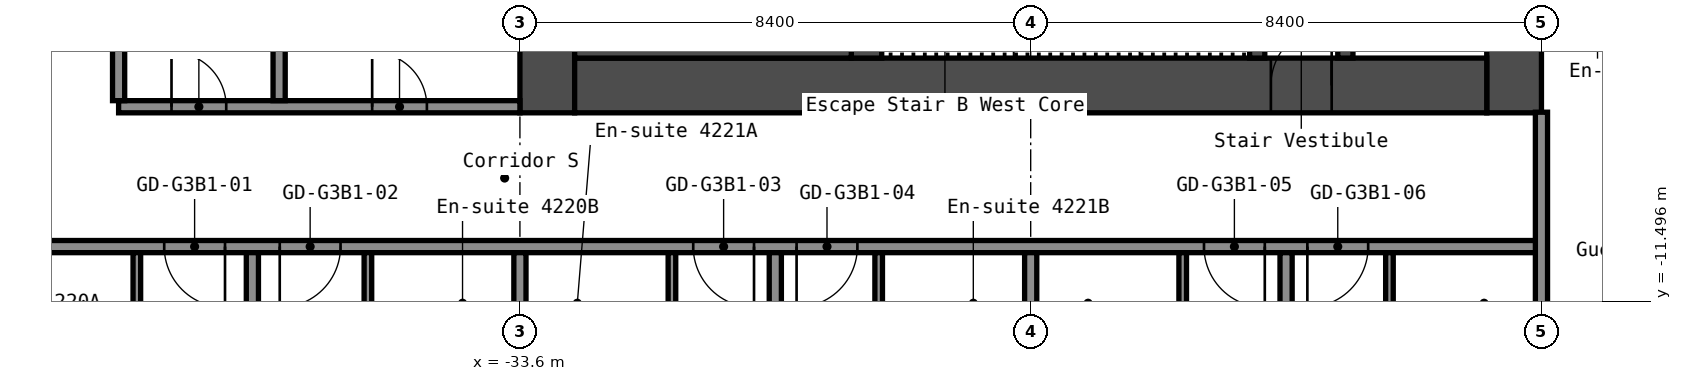
"""IFC4 building model, lengths in metres.
Left out: names, types, materials, properties, quantities, classifications, styles, units other than length and angle.
Written with IfcOpenShell. Run it as: python <this file> out.ifc"""

import sys

from ifc_helpers import new_model, si_unit, direction, frame, frame_2d, origin, place, context, subcontext, project, spatial, rectangle, extrude, element, fill, save


model = new_model("IFC4")
c1 = context("Model", 3, precision=1e-05, world=origin(), true_north=direction((0.0, 1.0)))
c2 = subcontext(c1, "Body", "Model", "MODEL_VIEW")
j1 = project(units=[si_unit("LENGTHUNIT", "METRE"), si_unit("PLANEANGLEUNIT", "RADIAN")], contexts=[c1])
p1 = place(None, origin())
s1 = spatial("IfcSite", under=j1, at=p1, CompositionType="ELEMENT")
p2 = place(p1, origin())
s2 = spatial("IfcBuilding", under=s1, at=p2, CompositionType="ELEMENT")
p3 = place(p2, frame((0.0, 0.0, 150.2)))
s3 = spatial("IfcBuildingStorey", under=s2, at=p3, CompositionType="ELEMENT", Elevation=150.2)
p4 = place(p3, frame((-17.25, -8.4, 0.0), z_axis=(0.0, 0.0, 1.0), x_axis=(0.0, 1.0, 0.0)))
e1 = element("IfcWall", 1, at=p4, inside=s3, PredefinedType="SHEAR", context=c2, shape_type="SweptSolid", body=[
    extrude(rectangle(XDim=16.8, YDim=0.9, at=frame_2d((8.4, 0.0))), origin(), (0.0, 0.0, 1.0), 2.75),
])
p5 = place(p4, frame((7.1, 0.0, 0.0)))
e2 = element("IfcOpeningElement", 2, at=p5, cuts=e1, PredefinedType="OPENING", context=c2, shape_type="SweptSolid", body=[
    extrude(rectangle(XDim=1.6, YDim=2.1, at=frame_2d((0.8, 1.05))), frame((0.0, 0.46, 0.0), z_axis=(0.0, -1.0, 0.0), x_axis=(1.0, 0.0, 0.0)), (0.0, 0.0, 1.0), 0.92),
])
p6 = place(p3, frame((-33.15, -8.4, 0.0), z_axis=(0.0, 0.0, 1.0), x_axis=(0.0, 1.0, 0.0)))
e3 = element("IfcWall", 3, at=p6, inside=s3, PredefinedType="SHEAR", context=c2, shape_type="SweptSolid", body=[
    extrude(rectangle(XDim=16.8, YDim=0.9, at=frame_2d((8.4, 0.0))), origin(), (0.0, 0.0, 1.0), 2.75),
])
p7 = place(p3, frame((-32.7, -7.95, 0.0), z_axis=(0.0, 0.0, 1.0), x_axis=(1.0, 0.0, 0.0)))
e4 = element("IfcWall", 4, at=p7, inside=s3, PredefinedType="SHEAR", context=c2, shape_type="SweptSolid", body=[
    extrude(rectangle(XDim=15.0, YDim=0.9, at=frame_2d((7.5, 0.0))), origin(), (0.0, 0.0, 1.0), 2.75),
])
p8 = place(p7, frame((11.45, 0.0, 0.0)))
e5 = element("IfcOpeningElement", 5, at=p8, cuts=e4, PredefinedType="OPENING", context=c2, shape_type="SweptSolid", body=[
    extrude(rectangle(XDim=1.0, YDim=2.1, at=frame_2d((0.5, 1.05))), frame((0.0, 0.46, 0.0), z_axis=(0.0, -1.0, 0.0), x_axis=(1.0, 0.0, 0.0)), (0.0, 0.0, 1.0), 0.92),
])
p9 = place(p3, frame((-20.025, -7.5, 0.0), z_axis=(0.0, 0.0, 1.0), x_axis=(0.0, 1.0, 0.0)))
e6 = element("IfcWall", 6, at=p9, inside=s3, PredefinedType="SHEAR", context=c2, shape_type="SweptSolid", body=[
    extrude(rectangle(XDim=6.3, YDim=0.25, at=frame_2d((3.15, 0.0))), origin(), (0.0, 0.0, 1.0), 2.75),
])
p10 = place(p9, frame((2.4, 0.0, 0.0)))
e7 = element("IfcOpeningElement", 7, at=p10, cuts=e6, PredefinedType="OPENING", context=c2, shape_type="SweptSolid", body=[
    extrude(rectangle(XDim=1.0, YDim=2.1, at=frame_2d((0.5, 1.05))), frame((0.0, 0.135, 0.0), z_axis=(0.0, -1.0, 0.0), x_axis=(1.0, 0.0, 0.0)), (0.0, 0.0, 1.0), 0.27),
])
p11 = place(p3, frame((-21.475, -7.5, 0.0), z_axis=(0.0, 0.0, 1.0), x_axis=(0.0, 1.0, 0.0)))
e8 = element("IfcWall", 8, at=p11, inside=s3, PredefinedType="SHEAR", context=c2, shape_type="SweptSolid", body=[
    extrude(rectangle(XDim=3.75, YDim=0.25, at=frame_2d((1.875, 0.0))), origin(), (0.0, 0.0, 1.0), 2.75),
])
p12 = place(p11, frame((1.3, 0.0, 0.0)))
e9 = element("IfcOpeningElement", 9, at=p12, cuts=e8, PredefinedType="OPENING", context=c2, shape_type="SweptSolid", body=[
    extrude(rectangle(XDim=1.2, YDim=2.1, at=frame_2d((0.6, 1.05))), frame((0.0, 0.135, 0.0), z_axis=(0.0, -1.0, 0.0), x_axis=(1.0, 0.0, 0.0)), (0.0, 0.0, 1.0), 0.27),
])
p13 = place(p3, frame((-27.9, -7.5, 0.0), z_axis=(0.0, 0.0, 1.0), x_axis=(0.0, 1.0, 0.0)))
e10 = element("IfcWall", 10, at=p13, inside=s3, PredefinedType="SHEAR", context=c2, shape_type="SweptSolid", body=[
    extrude(rectangle(XDim=3.75, YDim=0.5, at=frame_2d((1.875, 0.0))), origin(), (0.0, 0.0, 1.0), 2.75),
])
p14 = place(p3, frame((-32.7, -6.75, 0.0), z_axis=(0.0, 0.0, 1.0), x_axis=(1.0, 0.0, 0.0)))
e11 = element("IfcWall", 11, at=p14, inside=s3, PredefinedType="SHEAR", context=c2, shape_type="SweptSolid", body=[
    extrude(rectangle(XDim=4.55, YDim=1.5, at=frame_2d((2.275, 0.0))), origin(), (0.0, 0.0, 1.0), 2.75),
])
p15 = place(p3, frame((-42.7, -10.6, 0.0), z_axis=(0.0, 0.0, 1.0), x_axis=(1.0, 0.0, 0.0)))
e12 = element("IfcWall", 12, at=p15, inside=s3, PredefinedType="PARTITIONING", context=c2, shape_type="SweptSolid", body=[
    extrude(rectangle(XDim=25.9, YDim=0.2, at=frame_2d((12.95, 0.0))), origin(), (0.0, 0.0, 1.0), 2.75),
])
p16 = place(p15, frame((3.25, 0.0, 0.0)))
e13 = element("IfcOpeningElement", 13, at=p16, cuts=e12, PredefinedType="OPENING", context=c2, shape_type="SweptSolid", body=[
    extrude(rectangle(XDim=1.0, YDim=2.1, at=frame_2d((0.5, 1.05))), frame((0.0, 0.11, 0.0), z_axis=(0.0, -1.0, 0.0), x_axis=(1.0, 0.0, 0.0)), (0.0, 0.0, 1.0), 0.22),
])
p17 = place(p15, frame((5.15, 0.0, 0.0)))
e14 = element("IfcOpeningElement", 14, at=p17, cuts=e12, PredefinedType="OPENING", context=c2, shape_type="SweptSolid", body=[
    extrude(rectangle(XDim=1.0, YDim=2.1, at=frame_2d((0.5, 1.05))), frame((0.0, 0.11, 0.0), z_axis=(0.0, -1.0, 0.0), x_axis=(1.0, 0.0, 0.0)), (0.0, 0.0, 1.0), 0.22),
])
p18 = place(p15, frame((11.95, 0.0, 0.0)))
e15 = element("IfcOpeningElement", 15, at=p18, cuts=e12, PredefinedType="OPENING", context=c2, shape_type="SweptSolid", body=[
    extrude(rectangle(XDim=1.0, YDim=2.1, at=frame_2d((0.5, 1.05))), frame((0.0, 0.11, 0.0), z_axis=(0.0, -1.0, 0.0), x_axis=(1.0, 0.0, 0.0)), (0.0, 0.0, 1.0), 0.22),
])
p19 = place(p15, frame((13.65, 0.0, 0.0)))
e16 = element("IfcOpeningElement", 16, at=p19, cuts=e12, PredefinedType="OPENING", context=c2, shape_type="SweptSolid", body=[
    extrude(rectangle(XDim=1.0, YDim=2.1, at=frame_2d((0.5, 1.05))), frame((0.0, 0.11, 0.0), z_axis=(0.0, -1.0, 0.0), x_axis=(1.0, 0.0, 0.0)), (0.0, 0.0, 1.0), 0.22),
])
p20 = place(p15, frame((20.35, 0.0, 0.0)))
e17 = element("IfcOpeningElement", 17, at=p20, cuts=e12, PredefinedType="OPENING", context=c2, shape_type="SweptSolid", body=[
    extrude(rectangle(XDim=1.0, YDim=2.1, at=frame_2d((0.5, 1.05))), frame((0.0, 0.11, 0.0), z_axis=(0.0, -1.0, 0.0), x_axis=(1.0, 0.0, 0.0)), (0.0, 0.0, 1.0), 0.22),
])
p21 = place(p15, frame((22.05, 0.0, 0.0)))
e18 = element("IfcOpeningElement", 18, at=p21, cuts=e12, PredefinedType="OPENING", context=c2, shape_type="SweptSolid", body=[
    extrude(rectangle(XDim=1.0, YDim=2.1, at=frame_2d((0.5, 1.05))), frame((0.0, 0.11, 0.0), z_axis=(0.0, -1.0, 0.0), x_axis=(1.0, 0.0, 0.0)), (0.0, 0.0, 1.0), 0.22),
])
p22 = place(p3, frame((-40.2, -8.3, 0.0), z_axis=(0.0, 0.0, 1.0), x_axis=(1.0, 0.0, 0.0)))
e19 = element("IfcWall", 19, at=p22, inside=s3, PredefinedType="PARTITIONING", context=c2, shape_type="SweptSolid", body=[
    extrude(rectangle(XDim=6.6, YDim=0.2, at=frame_2d((3.3, 0.0))), origin(), (0.0, 0.0, 1.0), 2.75),
])
p23 = place(p22, frame((0.87, 0.0, 0.0)))
e20 = element("IfcOpeningElement", 20, at=p23, cuts=e19, PredefinedType="OPENING", context=c2, shape_type="SweptSolid", body=[
    extrude(rectangle(XDim=0.9, YDim=2.1, at=frame_2d((0.45, 1.05))), frame((0.0, 0.11, 0.0), z_axis=(0.0, -1.0, 0.0), x_axis=(1.0, 0.0, 0.0)), (0.0, 0.0, 1.0), 0.22),
])
p24 = place(p22, frame((4.17, 0.0, 0.0)))
e21 = element("IfcOpeningElement", 21, at=p24, cuts=e19, PredefinedType="OPENING", context=c2, shape_type="SweptSolid", body=[
    extrude(rectangle(XDim=0.9, YDim=2.1, at=frame_2d((0.45, 1.05))), frame((0.0, 0.11, 0.0), z_axis=(0.0, -1.0, 0.0), x_axis=(1.0, 0.0, 0.0)), (0.0, 0.0, 1.0), 0.22),
])
p25 = place(p3, frame((-40.2, -8.2, 0.0), z_axis=(0.0, 0.0, 1.0), x_axis=(0.0, 1.0, 0.0)))
e22 = element("IfcWall", 22, at=p25, inside=s3, PredefinedType="PARTITIONING", context=c2, shape_type="SweptSolid", body=[
    extrude(rectangle(XDim=16.4, YDim=0.2, at=frame_2d((8.2, 0.0))), origin(), (0.0, 0.0, 1.0), 2.75),
])
p26 = place(p3, frame((-39.9, -13.6, 0.0), z_axis=(0.0, 0.0, 1.0), x_axis=(0.0, 1.0, 0.0)))
e23 = element("IfcWall", 23, at=p26, inside=s3, PredefinedType="PARTITIONING", context=c2, shape_type="SweptSolid", body=[
    extrude(rectangle(XDim=2.9, YDim=0.125, at=frame_2d((1.45, 0.0))), origin(), (0.0, 0.0, 1.0), 2.75),
])
p27 = place(p26, frame((0.6, 0.0, 0.0)))
e24 = element("IfcOpeningElement", 24, at=p27, cuts=e23, PredefinedType="OPENING", context=c2, shape_type="SweptSolid", body=[
    extrude(rectangle(XDim=0.8, YDim=2.1, at=frame_2d((0.4, 1.05))), frame((0.0, 0.073, 0.0), z_axis=(0.0, -1.0, 0.0), x_axis=(1.0, 0.0, 0.0)), (0.0, 0.0, 1.0), 0.145),
])
p28 = place(p3, frame((-38.0, -19.3, 0.0), z_axis=(0.0, 0.0, 1.0), x_axis=(0.0, 1.0, 0.0)))
e25 = element("IfcWall", 25, at=p28, inside=s3, PredefinedType="PARTITIONING", context=c2, shape_type="SweptSolid", body=[
    extrude(rectangle(XDim=8.6, YDim=0.2, at=frame_2d((4.3, 0.0))), origin(), (0.0, 0.0, 1.0), 2.75),
])
p29 = place(p3, frame((-37.56, -8.2, 0.0), z_axis=(0.0, 0.0, 1.0), x_axis=(0.0, 1.0, 0.0)))
e26 = element("IfcWall", 26, at=p29, inside=s3, PredefinedType="PARTITIONING", context=c2, shape_type="SweptSolid", body=[
    extrude(rectangle(XDim=8.2, YDim=0.2, at=frame_2d((4.1, 0.0))), origin(), (0.0, 0.0, 1.0), 2.75),
])
p30 = place(p3, frame((-36.1, -13.6, 0.0), z_axis=(0.0, 0.0, 1.0), x_axis=(0.0, 1.0, 0.0)))
e27 = element("IfcWall", 27, at=p30, inside=s3, PredefinedType="PARTITIONING", context=c2, shape_type="SweptSolid", body=[
    extrude(rectangle(XDim=2.9, YDim=0.125, at=frame_2d((1.45, 0.0))), origin(), (0.0, 0.0, 1.0), 2.75),
])
p31 = place(p30, frame((0.6, 0.0, 0.0)))
e28 = element("IfcOpeningElement", 28, at=p31, cuts=e27, PredefinedType="OPENING", context=c2, shape_type="SweptSolid", body=[
    extrude(rectangle(XDim=0.8, YDim=2.1, at=frame_2d((0.4, 1.05))), frame((0.0, 0.073, 0.0), z_axis=(0.0, -1.0, 0.0), x_axis=(1.0, 0.0, 0.0)), (0.0, 0.0, 1.0), 0.145),
])
p32 = place(p3, frame((-33.6, -19.3, 0.0), z_axis=(0.0, 0.0, 1.0), x_axis=(0.0, 1.0, 0.0)))
e29 = element("IfcWall", 29, at=p32, inside=s3, PredefinedType="PARTITIONING", context=c2, shape_type="SweptSolid", body=[
    extrude(rectangle(XDim=8.6, YDim=0.2, at=frame_2d((4.3, 0.0))), origin(), (0.0, 0.0, 1.0), 2.75),
])
p33 = place(p3, frame((-31.1, -13.6, 0.0), z_axis=(0.0, 0.0, 1.0), x_axis=(0.0, 1.0, 0.0)))
e30 = element("IfcWall", 30, at=p33, inside=s3, PredefinedType="PARTITIONING", context=c2, shape_type="SweptSolid", body=[
    extrude(rectangle(XDim=2.9, YDim=0.125, at=frame_2d((1.45, 0.0))), origin(), (0.0, 0.0, 1.0), 2.75),
])
p34 = place(p33, frame((0.6, 0.0, 0.0)))
e31 = element("IfcOpeningElement", 31, at=p34, cuts=e30, PredefinedType="OPENING", context=c2, shape_type="SweptSolid", body=[
    extrude(rectangle(XDim=0.8, YDim=2.1, at=frame_2d((0.4, 1.05))), frame((0.0, 0.073, 0.0), z_axis=(0.0, -1.0, 0.0), x_axis=(1.0, 0.0, 0.0)), (0.0, 0.0, 1.0), 0.145),
])
p35 = place(p3, frame((-29.4, -19.3, 0.0), z_axis=(0.0, 0.0, 1.0), x_axis=(0.0, 1.0, 0.0)))
e32 = element("IfcWall", 32, at=p35, inside=s3, PredefinedType="PARTITIONING", context=c2, shape_type="SweptSolid", body=[
    extrude(rectangle(XDim=8.6, YDim=0.2, at=frame_2d((4.3, 0.0))), origin(), (0.0, 0.0, 1.0), 2.75),
])
p36 = place(p3, frame((-27.7, -13.6, 0.0), z_axis=(0.0, 0.0, 1.0), x_axis=(0.0, 1.0, 0.0)))
e33 = element("IfcWall", 33, at=p36, inside=s3, PredefinedType="PARTITIONING", context=c2, shape_type="SweptSolid", body=[
    extrude(rectangle(XDim=2.9, YDim=0.125, at=frame_2d((1.45, 0.0))), origin(), (0.0, 0.0, 1.0), 2.75),
])
p37 = place(p36, frame((0.6, 0.0, 0.0)))
e34 = element("IfcOpeningElement", 34, at=p37, cuts=e33, PredefinedType="OPENING", context=c2, shape_type="SweptSolid", body=[
    extrude(rectangle(XDim=0.8, YDim=2.1, at=frame_2d((0.4, 1.05))), frame((0.0, 0.073, 0.0), z_axis=(0.0, -1.0, 0.0), x_axis=(1.0, 0.0, 0.0)), (0.0, 0.0, 1.0), 0.145),
])
p38 = place(p3, frame((-25.2, -19.3, 0.0), z_axis=(0.0, 0.0, 1.0), x_axis=(0.0, 1.0, 0.0)))
e35 = element("IfcWall", 35, at=p38, inside=s3, PredefinedType="PARTITIONING", context=c2, shape_type="SweptSolid", body=[
    extrude(rectangle(XDim=8.6, YDim=0.2, at=frame_2d((4.3, 0.0))), origin(), (0.0, 0.0, 1.0), 2.75),
])
p39 = place(p3, frame((-22.7, -13.6, 0.0), z_axis=(0.0, 0.0, 1.0), x_axis=(0.0, 1.0, 0.0)))
e36 = element("IfcWall", 36, at=p39, inside=s3, PredefinedType="PARTITIONING", context=c2, shape_type="SweptSolid", body=[
    extrude(rectangle(XDim=2.9, YDim=0.125, at=frame_2d((1.45, 0.0))), origin(), (0.0, 0.0, 1.0), 2.75),
])
p40 = place(p39, frame((0.6, 0.0, 0.0)))
e37 = element("IfcOpeningElement", 37, at=p40, cuts=e36, PredefinedType="OPENING", context=c2, shape_type="SweptSolid", body=[
    extrude(rectangle(XDim=0.8, YDim=2.1, at=frame_2d((0.4, 1.05))), frame((0.0, 0.073, 0.0), z_axis=(0.0, -1.0, 0.0), x_axis=(1.0, 0.0, 0.0)), (0.0, 0.0, 1.0), 0.145),
])
p41 = place(p3, frame((-21.0, -19.3, 0.0), z_axis=(0.0, 0.0, 1.0), x_axis=(0.0, 1.0, 0.0)))
e38 = element("IfcWall", 38, at=p41, inside=s3, PredefinedType="PARTITIONING", context=c2, shape_type="SweptSolid", body=[
    extrude(rectangle(XDim=8.6, YDim=0.2, at=frame_2d((4.3, 0.0))), origin(), (0.0, 0.0, 1.0), 2.75),
])
p42 = place(p3, frame((-19.3, -13.6, 0.0), z_axis=(0.0, 0.0, 1.0), x_axis=(0.0, 1.0, 0.0)))
e39 = element("IfcWall", 39, at=p42, inside=s3, PredefinedType="PARTITIONING", context=c2, shape_type="SweptSolid", body=[
    extrude(rectangle(XDim=2.9, YDim=0.125, at=frame_2d((1.45, 0.0))), origin(), (0.0, 0.0, 1.0), 2.75),
])
p43 = place(p42, frame((0.6, 0.0, 0.0)))
e40 = element("IfcOpeningElement", 40, at=p43, cuts=e39, PredefinedType="OPENING", context=c2, shape_type="SweptSolid", body=[
    extrude(rectangle(XDim=0.8, YDim=2.1, at=frame_2d((0.4, 1.05))), frame((0.0, 0.073, 0.0), z_axis=(0.0, -1.0, 0.0), x_axis=(1.0, 0.0, 0.0)), (0.0, 0.0, 1.0), 0.145),
])
p44 = place(p3, frame((-16.8, -19.3, 0.0), z_axis=(0.0, 0.0, 1.0), x_axis=(0.0, 1.0, 0.0)))
e41 = element("IfcWall", 41, at=p44, inside=s3, PredefinedType="PARTITIONING", context=c2, shape_type="SweptSolid", body=[
    extrude(rectangle(XDim=10.91, YDim=0.2, at=frame_2d((5.455, 0.0))), origin(), (0.0, 0.0, 1.0), 2.75),
])
p45 = place(p8, origin())
e42 = element("IfcDoor", 42, at=p45, inside=s3, OperationType="SINGLE_SWING_LEFT", PredefinedType="DOOR", context=c2, shape_type="SweptSolid", body=[
    extrude(rectangle(XDim=1.0, YDim=2.1, at=frame_2d((0.5, 1.05))), frame((0.0, 0.025, 0.0), z_axis=(0.0, -1.0, 0.0), x_axis=(1.0, 0.0, 0.0)), (0.0, 0.0, 1.0), 0.05),
])
fill(e5, e42)
p46 = place(p16, origin())
e43 = element("IfcDoor", 43, at=p46, inside=s3, OperationType="SINGLE_SWING_RIGHT", PredefinedType="DOOR", context=c2, shape_type="SweptSolid", body=[
    extrude(rectangle(XDim=1.0, YDim=2.1, at=frame_2d((0.5, 1.05))), frame((0.0, 0.025, 0.0), z_axis=(0.0, -1.0, 0.0), x_axis=(1.0, 0.0, 0.0)), (0.0, 0.0, 1.0), 0.05),
])
fill(e13, e43)
p47 = place(p17, origin())
e44 = element("IfcDoor", 44, at=p47, inside=s3, OperationType="SINGLE_SWING_LEFT", PredefinedType="DOOR", context=c2, shape_type="SweptSolid", body=[
    extrude(rectangle(XDim=1.0, YDim=2.1, at=frame_2d((0.5, 1.05))), frame((0.0, 0.025, 0.0), z_axis=(0.0, -1.0, 0.0), x_axis=(1.0, 0.0, 0.0)), (0.0, 0.0, 1.0), 0.05),
])
fill(e14, e44)
p48 = place(p18, origin())
e45 = element("IfcDoor", 45, at=p48, inside=s3, OperationType="SINGLE_SWING_RIGHT", PredefinedType="DOOR", context=c2, shape_type="SweptSolid", body=[
    extrude(rectangle(XDim=1.0, YDim=2.1, at=frame_2d((0.5, 1.05))), frame((0.0, 0.025, 0.0), z_axis=(0.0, -1.0, 0.0), x_axis=(1.0, 0.0, 0.0)), (0.0, 0.0, 1.0), 0.05),
])
fill(e15, e45)
p49 = place(p19, origin())
e46 = element("IfcDoor", 46, at=p49, inside=s3, OperationType="SINGLE_SWING_LEFT", PredefinedType="DOOR", context=c2, shape_type="SweptSolid", body=[
    extrude(rectangle(XDim=1.0, YDim=2.1, at=frame_2d((0.5, 1.05))), frame((0.0, 0.025, 0.0), z_axis=(0.0, -1.0, 0.0), x_axis=(1.0, 0.0, 0.0)), (0.0, 0.0, 1.0), 0.05),
])
fill(e16, e46)
p50 = place(p20, origin())
e47 = element("IfcDoor", 47, at=p50, inside=s3, OperationType="SINGLE_SWING_RIGHT", PredefinedType="DOOR", context=c2, shape_type="SweptSolid", body=[
    extrude(rectangle(XDim=1.0, YDim=2.1, at=frame_2d((0.5, 1.05))), frame((0.0, 0.025, 0.0), z_axis=(0.0, -1.0, 0.0), x_axis=(1.0, 0.0, 0.0)), (0.0, 0.0, 1.0), 0.05),
])
fill(e17, e47)
p51 = place(p21, origin())
e48 = element("IfcDoor", 48, at=p51, inside=s3, OperationType="SINGLE_SWING_LEFT", PredefinedType="DOOR", context=c2, shape_type="SweptSolid", body=[
    extrude(rectangle(XDim=1.0, YDim=2.1, at=frame_2d((0.5, 1.05))), frame((0.0, 0.025, 0.0), z_axis=(0.0, -1.0, 0.0), x_axis=(1.0, 0.0, 0.0)), (0.0, 0.0, 1.0), 0.05),
])
fill(e18, e48)
p52 = place(p23, origin())
e49 = element("IfcDoor", 49, at=p52, inside=s3, OperationType="SINGLE_SWING_RIGHT", PredefinedType="DOOR", context=c2, shape_type="SweptSolid", body=[
    extrude(rectangle(XDim=0.9, YDim=2.1, at=frame_2d((0.45, 1.05))), frame((0.0, 0.025, 0.0), z_axis=(0.0, -1.0, 0.0), x_axis=(1.0, 0.0, 0.0)), (0.0, 0.0, 1.0), 0.05),
])
fill(e20, e49)
p53 = place(p24, origin())
e50 = element("IfcDoor", 50, at=p53, inside=s3, OperationType="SINGLE_SWING_RIGHT", PredefinedType="DOOR", context=c2, shape_type="SweptSolid", body=[
    extrude(rectangle(XDim=0.9, YDim=2.1, at=frame_2d((0.45, 1.05))), frame((0.0, 0.025, 0.0), z_axis=(0.0, -1.0, 0.0), x_axis=(1.0, 0.0, 0.0)), (0.0, 0.0, 1.0), 0.05),
])
fill(e21, e50)
save(model, sys.argv[1])
